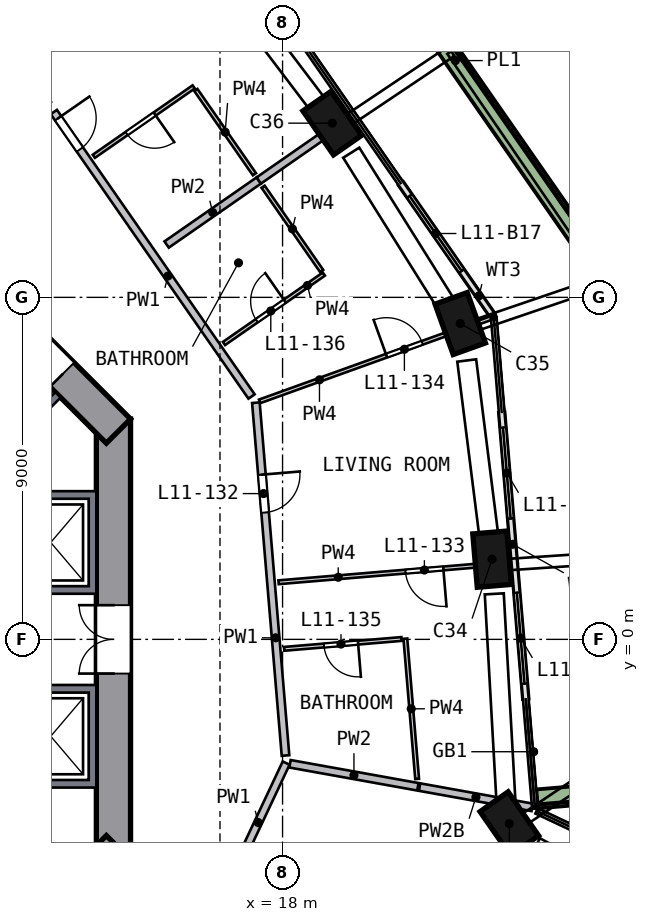
"""IFC4 building model, lengths in metres.
Left out: names, types, materials, properties, quantities, classifications, styles, units other than length and angle.
Written with IfcOpenShell. Run it as: python <this file> out.ifc"""

import sys

from ifc_helpers import new_model, si_unit, direction, frame, frame_2d, origin, origin_2d, place, context, subcontext, project, spatial, polyline, rectangle, outline, extrude, element, fill, save


model = new_model("IFC4")
c1 = context("Model", 3, precision=1e-05, world=origin(), true_north=direction((0.0, 1.0)))
c2 = subcontext(c1, "Body", "Model", "MODEL_VIEW")
j1 = project(units=[si_unit("LENGTHUNIT", "METRE"), si_unit("PLANEANGLEUNIT", "RADIAN")], contexts=[c1])
p1 = place(None, origin())
s1 = spatial("IfcSite", under=j1, at=p1, CompositionType="ELEMENT")
p2 = place(p1, origin())
s2 = spatial("IfcBuilding", under=s1, at=p2, CompositionType="ELEMENT")
p3 = place(p2, frame((0.0, 0.0, 53.0)))
s3 = spatial("IfcBuildingStorey", under=s2, at=p3, CompositionType="ELEMENT", Elevation=53.0)
p4 = place(p3, frame((23.94, -4.988, 0.0), z_axis=(0.022728624, 0.114023197, 0.993218063), x_axis=(0.574642782, -0.814450427, 0.080350333)))
e1 = element("IfcColumn", 1, at=p4, inside=s3, PredefinedType="COLUMN", context=c2, shape_type="SweptSolid", body=[
    extrude(rectangle(XDim=1.4, YDim=0.9, at=origin_2d()), origin(), (0.0, 0.0, 1.0), 3.212),
])
p5 = place(p3, frame((23.525, 1.976, 0.0), z_axis=(-0.010266843, 0.111794513, 0.993678307), x_axis=(-0.082474278, 0.990250205, -0.11226097)))
e2 = element("IfcColumn", 2, at=p5, inside=s3, PredefinedType="COLUMN", context=c2, shape_type="SweptSolid", body=[
    extrude(rectangle(XDim=1.4, YDim=0.9, at=origin_2d()), origin(), (0.0, 0.0, 1.0), 3.21),
])
p6 = place(p3, frame((22.723, 8.181, 0.0), z_axis=(-0.03976275, 0.107731963, 0.993384491), x_axis=(0.336043012, -0.934820186, 0.114831678)))
e3 = element("IfcColumn", 3, at=p6, inside=s3, PredefinedType="COLUMN", context=c2, shape_type="SweptSolid", body=[
    extrude(rectangle(XDim=1.4, YDim=0.9, at=origin_2d()), origin(), (0.0, 0.0, 1.0), 3.211),
])
p7 = place(p3, frame((19.386, 13.474, 0.0), z_axis=(-0.064871143, 0.091640946, 0.993676845), x_axis=(-0.567217406, 0.815879269, -0.112273915)))
e4 = element("IfcColumn", 4, at=p7, inside=s3, PredefinedType="COLUMN", context=c2, shape_type="SweptSolid", body=[
    extrude(rectangle(XDim=1.4, YDim=0.9, at=origin_2d()), origin(), (0.0, 0.0, 1.0), 3.21),
])
p8 = place(p3, frame((13.55, -5.799, 0.0), z_axis=(0.0, 0.0, 1.0), x_axis=(0.0, 1.0, 0.0)))
e5 = element("IfcWall", 5, at=p8, inside=s3, PredefinedType="SHEAR", context=c2, shape_type="SweptSolid", body=[
    extrude(rectangle(XDim=11.598, YDim=0.9, at=frame_2d((5.799, 0.0))), origin(), (0.0, 0.0, 1.0), 3.5),
])
p9 = place(p8, frame((4.899, 0.0, 0.0)))
e6 = element("IfcOpeningElement", 6, at=p9, cuts=e5, PredefinedType="OPENING", context=c2, shape_type="SweptSolid", body=[
    extrude(rectangle(XDim=1.8, YDim=2.1, at=frame_2d((0.9, 1.05))), frame((0.0, 0.46, 0.0), z_axis=(0.0, -1.0, 0.0), x_axis=(1.0, 0.0, 0.0)), (0.0, 0.0, 1.0), 0.92),
])
p10 = place(p3, frame((13.682, 5.481, 0.0), z_axis=(0.0, 0.0, 1.0), x_axis=(-0.707106781, 0.707106781, 0.0)))
e7 = element("IfcWall", 7, at=p10, inside=s3, PredefinedType="SHEAR", context=c2, shape_type="SweptSolid", body=[
    extrude(rectangle(XDim=11.598, YDim=0.9, at=frame_2d((5.799, 0.0))), origin(), (0.0, 0.0, 1.0), 3.5),
])
p11 = place(p10, frame((2.099, 0.0, 0.0)))
e8 = element("IfcOpeningElement", 8, at=p11, cuts=e7, PredefinedType="OPENING", context=c2, shape_type="SweptSolid", body=[
    extrude(rectangle(XDim=1.2, YDim=2.1, at=frame_2d((0.6, 1.05))), frame((0.0, 0.46, 0.0), z_axis=(0.0, -1.0, 0.0), x_axis=(1.0, 0.0, 0.0)), (0.0, 0.0, 1.0), 0.92),
])
p12 = place(p3, frame((5.481, -13.682, 0.0), z_axis=(0.0, 0.0, 1.0), x_axis=(0.707106781, 0.707106781, 0.0)))
e9 = element("IfcWall", 9, at=p12, inside=s3, PredefinedType="SHEAR", context=c2, shape_type="SweptSolid", body=[
    extrude(rectangle(XDim=11.598, YDim=0.9, at=frame_2d((5.799, 0.0))), origin(), (0.0, 0.0, 1.0), 3.5),
])
p13 = place(p12, frame((2.099, 0.0, 0.0)))
e10 = element("IfcOpeningElement", 10, at=p13, cuts=e9, PredefinedType="OPENING", context=c2, shape_type="SweptSolid", body=[
    extrude(rectangle(XDim=1.2, YDim=2.1, at=frame_2d((0.6, 1.05))), frame((0.0, 0.46, 0.0), z_axis=(0.0, -1.0, 0.0), x_axis=(1.0, 0.0, 0.0)), (0.0, 0.0, 1.0), 0.92),
])
p14 = place(p3, frame((24.4, -1.564, 0.0), z_axis=(0.0, 0.0, 1.0), x_axis=(-0.083617932, 0.996497888, 0.0)))
e11 = element("IfcWall", 11, at=p14, inside=s3, PredefinedType="SOLIDWALL", context=c2, shape_type="SweptSolid", body=[
    extrude(rectangle(XDim=3.6, YDim=0.15, at=frame_2d((1.8, 0.0))), origin(), (0.0, 0.0, 1.0), 2.425),
])
p15 = place(p14, frame((0.4, 0.0, 0.0)))
e12 = element("IfcOpeningElement", 12, at=p15, cuts=e11, PredefinedType="OPENING", context=c2, shape_type="SweptSolid", body=[
    extrude(rectangle(XDim=2.4, YDim=2.4, at=frame_2d((1.2, 1.2))), frame((0.0, 0.085, 0.0), z_axis=(0.0, -1.0, 0.0), x_axis=(1.0, 0.0, 0.0)), (0.0, 0.0, 1.0), 0.17),
])
p16 = place(p3, frame((24.099, 2.024, 0.0), z_axis=(0.0, 0.0, 1.0), x_axis=(-0.083713777, 0.996489841, 0.0)))
e13 = element("IfcWall", 13, at=p16, inside=s3, PredefinedType="SOLIDWALL", context=c2, shape_type="SweptSolid", body=[
    extrude(rectangle(XDim=3.96, YDim=0.15, at=frame_2d((1.98, 0.0))), origin(), (0.0, 0.0, 1.0), 2.425),
])
p17 = place(p16, frame((1.16, 0.0, 0.0)))
e14 = element("IfcOpeningElement", 14, at=p17, cuts=e13, PredefinedType="OPENING", context=c2, shape_type="SweptSolid", body=[
    extrude(rectangle(XDim=2.4, YDim=2.4, at=frame_2d((1.2, 1.2))), frame((0.0, 0.085, 0.0), z_axis=(0.0, -1.0, 0.0), x_axis=(1.0, 0.0, 0.0)), (0.0, 0.0, 1.0), 0.17),
])
p18 = place(p3, frame((23.51, 8.547, 0.0), z_axis=(0.0, 0.0, 1.0), x_axis=(-0.570711776, 0.821150454, 0.0)))
e15 = element("IfcWall", 15, at=p18, inside=s3, PredefinedType="SOLIDWALL", context=c2, shape_type="SweptSolid", body=[
    extrude(rectangle(XDim=4.199, YDim=0.15, at=frame_2d((2.099, 0.0))), origin(), (0.0, 0.0, 1.0), 2.425),
])
p19 = place(p18, frame((1.399, 0.0, 0.0)))
e16 = element("IfcOpeningElement", 16, at=p19, cuts=e15, PredefinedType="OPENING", context=c2, shape_type="SweptSolid", body=[
    extrude(rectangle(XDim=2.4, YDim=2.4, at=frame_2d((1.2, 1.2))), frame((0.0, 0.085, 0.0), z_axis=(0.0, -1.0, 0.0), x_axis=(1.0, 0.0, 0.0)), (0.0, 0.0, 1.0), 0.17),
])
p20 = place(p3, frame((24.697, -4.198, 0.0), z_axis=(0.0, 0.0, 1.0), x_axis=(0.996495576, 0.083645489, 0.0)))
e17 = element("IfcWall", 17, at=p20, inside=s3, PredefinedType="SOLIDWALL", context=c2, shape_type="SweptSolid", body=[
    extrude(rectangle(XDim=3.199, YDim=0.5, at=frame_2d((1.6, 0.0))), origin(), (0.0, 0.0, 1.0), 0.7),
])
p21 = place(p3, frame((26.465, 9.597, 0.0), z_axis=(0.0, 0.0, 1.0), x_axis=(-0.570705822, 0.821154593, 0.0)))
e18 = element("IfcWall", 18, at=p21, inside=s3, PredefinedType="SOLIDWALL", context=c2, shape_type="SweptSolid", body=[
    extrude(rectangle(XDim=13.723, YDim=0.5, at=frame_2d((6.862, 0.0))), origin(), (0.0, 0.0, 1.0), 0.7),
])
p22 = place(p3, origin())
e19 = element("IfcWall", 19, at=p22, inside=s3, PredefinedType="SOLIDWALL", context=c2, shape_type="SweptSolid", body=[
    extrude(outline(polyline([(13.1, -3.9), (10.9, -3.9), (10.9, -3.7), (12.9, -3.7), (12.9, -1.4), (10.9, -1.4), (10.9, -1.2), (13.1, -1.2), (13.1, -3.9)])), origin(), (0.0, 0.0, 1.0), 3.19),
])
p23 = place(p3, origin())
e20 = element("IfcWall", 20, at=p23, inside=s3, PredefinedType="SOLIDWALL", context=c2, shape_type="SweptSolid", body=[
    extrude(outline(polyline([(13.1, 3.9), (13.1, 1.2), (10.9, 1.2), (10.9, 1.4), (12.9, 1.4), (12.9, 3.7), (10.9, 3.7), (10.9, 3.9), (13.1, 3.9)])), origin(), (0.0, 0.0, 1.0), 3.19),
])
for number, where, z_axis, x_axis in (
    (21, (9.334, 3.677, 0.0), (0.0, 0.0, 1.0), (0.707, 0.707, 0.0)),
    (22, (9.334, -3.677, 0.0), (0.0, 0.0, 1.0), (0.707, -0.707, 0.0)),
):
    element("IfcWall", number, at=place(p3, frame(where, z_axis=z_axis, x_axis=x_axis)), inside=s3, PredefinedType="SOLIDWALL", context=c2, shape_type="SweptSolid", body=[
        extrude(rectangle(XDim=3.9, YDim=0.2, at=frame_2d((1.95, 0.0))), origin(), (0.0, 0.0, 1.0), 3.19),
    ])
p24 = place(p3, frame((11.981, 13.877, 0.0), z_axis=(0.0, 0.0, 1.0), x_axis=(0.570714468, -0.821148583, 0.0)))
e23 = element("IfcWall", 23, at=p24, inside=s3, PredefinedType="SOLIDWALL", context=c2, shape_type="SweptSolid", body=[
    extrude(rectangle(XDim=9.116, YDim=0.2, at=frame_2d((4.558, 0.0))), origin(), (0.0, 0.0, 1.0), 3.19),
])
p25 = place(p24, frame((0.2, 0.0, 0.0)))
e24 = element("IfcOpeningElement", 24, at=p25, cuts=e23, PredefinedType="OPENING", context=c2, shape_type="SweptSolid", body=[
    extrude(rectangle(XDim=1.0, YDim=2.1, at=frame_2d((0.5, 1.05))), frame((0.0, 0.11, 0.0), z_axis=(0.0, -1.0, 0.0), x_axis=(1.0, 0.0, 0.0)), (0.0, 0.0, 1.0), 0.22),
])
p26 = place(p3, frame((16.622, -6.385, 0.0), z_axis=(0.0, 0.0, 1.0), x_axis=(0.425797036, 0.904818702, 0.0)))
e25 = element("IfcWall", 25, at=p26, inside=s3, PredefinedType="SOLIDWALL", context=c2, shape_type="SweptSolid", body=[
    extrude(rectangle(XDim=3.458, YDim=0.2, at=frame_2d((1.729, 0.0))), origin(), (0.0, 0.0, 1.0), 3.19),
])
p27 = place(p3, frame((17.298, 6.228, 0.0), z_axis=(0.0, 0.0, 1.0), x_axis=(0.083672212, -0.996493332, 0.0)))
e26 = element("IfcWall", 26, at=p27, inside=s3, PredefinedType="SOLIDWALL", context=c2, shape_type="SweptSolid", body=[
    extrude(rectangle(XDim=9.317, YDim=0.2, at=frame_2d((4.658, 0.0))), origin(), (0.0, 0.0, 1.0), 3.19),
])
p28 = place(p27, frame((1.9, 0.0, 0.0)))
e27 = element("IfcOpeningElement", 27, at=p28, cuts=e26, PredefinedType="OPENING", context=c2, shape_type="SweptSolid", body=[
    extrude(rectangle(XDim=1.0, YDim=2.1, at=frame_2d((0.5, 1.05))), frame((0.0, 0.11, 0.0), z_axis=(0.0, -1.0, 0.0), x_axis=(1.0, 0.0, 0.0)), (0.0, 0.0, 1.0), 0.22),
])
p29 = place(p3, frame((14.949, 10.39, 0.0), z_axis=(0.0, 0.0, 1.0), x_axis=(0.82115792, 0.570701034, 0.0)))
e28 = element("IfcWall", 28, at=p29, inside=s3, PredefinedType="SOLIDWALL", context=c2, shape_type="SweptSolid", body=[
    extrude(rectangle(XDim=2.953, YDim=0.2, at=frame_2d((1.476, 0.0))), origin(), (0.0, 0.0, 1.0), 3.19),
])
p30 = place(p3, frame((17.374, 12.075, 0.0), z_axis=(0.0, 0.0, 1.0), x_axis=(0.821109247, 0.570771062, 0.0)))
e29 = element("IfcWall", 29, at=p30, inside=s3, PredefinedType="SOLIDWALL", context=c2, shape_type="SweptSolid", body=[
    extrude(rectangle(XDim=2.95, YDim=0.2, at=frame_2d((1.475, 0.0))), origin(), (0.0, 0.0, 1.0), 3.19),
])
p31 = place(p3, frame((18.196, -3.274, 0.0), z_axis=(0.0, 0.0, 1.0), x_axis=(0.984190545, -0.177112877, 0.0)))
e30 = element("IfcWall", 30, at=p31, inside=s3, PredefinedType="SOLIDWALL", context=c2, shape_type="SweptSolid", body=[
    extrude(rectangle(XDim=3.418, YDim=0.2, at=frame_2d((1.709, 0.0))), origin(), (0.0, 0.0, 1.0), 3.19),
])
p32 = place(p3, frame((21.606, -3.887, 0.0), z_axis=(0.0, 0.0, 1.0), x_axis=(0.984186151, -0.177137293, 0.0)))
e31 = element("IfcWall", 31, at=p32, inside=s3, PredefinedType="SOLIDWALL", context=c2, shape_type="SweptSolid", body=[
    extrude(rectangle(XDim=3.011, YDim=0.2, at=frame_2d((1.506, 0.0))), origin(), (0.0, 0.0, 1.0), 2.69),
])
p33 = place(p3, frame((15.662, 14.539, 0.0), z_axis=(0.0, 0.0, 1.0), x_axis=(-0.821155462, -0.570704572, 0.0)))
e32 = element("IfcWall", 32, at=p33, inside=s3, PredefinedType="PARTITIONING", context=c2, shape_type="SweptSolid", body=[
    extrude(rectangle(XDim=3.2, YDim=0.1, at=frame_2d((1.6, 0.0))), origin(), (0.0, 0.0, 1.0), 3.19),
])
p34 = place(p33, frame((1.25, 0.0, 0.0)))
e33 = element("IfcOpeningElement", 33, at=p34, cuts=e32, PredefinedType="OPENING", context=c2, shape_type="SweptSolid", body=[
    extrude(rectangle(XDim=0.9, YDim=2.1, at=frame_2d((0.45, 1.05))), frame((0.0, 0.06, 0.0), z_axis=(0.0, -1.0, 0.0), x_axis=(1.0, 0.0, 0.0)), (0.0, 0.0, 1.0), 0.12),
])
p35 = place(p3, frame((15.719, 14.457, 0.0), z_axis=(0.0, 0.0, 1.0), x_axis=(0.570704152, -0.821155753, 0.0)))
e34 = element("IfcWall", 34, at=p35, inside=s3, PredefinedType="PARTITIONING", context=c2, shape_type="SweptSolid", body=[
    extrude(rectangle(XDim=2.7, YDim=0.1, at=frame_2d((1.35, 0.0))), origin(), (0.0, 0.0, 1.0), 3.19),
])
p36 = place(p3, frame((16.458, 7.786, 0.0), z_axis=(0.0, 0.0, 1.0), x_axis=(0.821166367, 0.570688881, 0.0)))
e35 = element("IfcWall", 35, at=p36, inside=s3, PredefinedType="PARTITIONING", context=c2, shape_type="SweptSolid", body=[
    extrude(rectangle(XDim=3.2, YDim=0.1, at=frame_2d((1.6, 0.0))), origin(), (0.0, 0.0, 1.0), 3.19),
])
p37 = place(p36, frame((1.05, 0.0, 0.0)))
e36 = element("IfcOpeningElement", 36, at=p37, cuts=e35, PredefinedType="OPENING", context=c2, shape_type="SweptSolid", body=[
    extrude(rectangle(XDim=0.9, YDim=2.1, at=frame_2d((0.45, 1.05))), frame((0.0, 0.06, 0.0), z_axis=(0.0, -1.0, 0.0), x_axis=(1.0, 0.0, 0.0)), (0.0, 0.0, 1.0), 0.12),
])
p38 = place(p3, frame((19.029, 9.694, 0.0), z_axis=(0.0, 0.0, 1.0), x_axis=(-0.570746527, 0.821126301, 0.0)))
e37 = element("IfcWall", 37, at=p38, inside=s3, PredefinedType="PARTITIONING", context=c2, shape_type="SweptSolid", body=[
    extrude(rectangle(XDim=2.7, YDim=0.1, at=frame_2d((1.35, 0.0))), origin(), (0.0, 0.0, 1.0), 3.19),
])
p39 = place(p3, frame((21.132, 0.01, 0.0), z_axis=(0.0, 0.0, 1.0), x_axis=(-0.996489589, -0.083716781, 0.0)))
e38 = element("IfcWall", 38, at=p39, inside=s3, PredefinedType="PARTITIONING", context=c2, shape_type="SweptSolid", body=[
    extrude(rectangle(XDim=3.1, YDim=0.1, at=frame_2d((1.55, 0.0))), origin(), (0.0, 0.0, 1.0), 3.19),
])
p40 = place(p39, frame((1.15, 0.0, 0.0)))
e39 = element("IfcOpeningElement", 39, at=p40, cuts=e38, PredefinedType="OPENING", context=c2, shape_type="SweptSolid", body=[
    extrude(rectangle(XDim=0.9, YDim=2.1, at=frame_2d((0.45, 1.05))), frame((0.0, 0.06, 0.0), z_axis=(0.0, -1.0, 0.0), x_axis=(1.0, 0.0, 0.0)), (0.0, 0.0, 1.0), 0.12),
])
p41 = place(p3, frame((17.395, 6.263, 0.0), z_axis=(0.0, 0.0, 1.0), x_axis=(0.940881645, 0.338735488, 0.0)))
e40 = element("IfcWall", 40, at=p41, inside=s3, PredefinedType="PARTITIONING", context=c2, shape_type="SweptSolid", body=[
    extrude(rectangle(XDim=6.476, YDim=0.1, at=frame_2d((3.238, 0.0))), origin(), (0.0, 0.0, 1.0), 3.19),
])
p42 = place(p41, frame((3.55, 0.0, 0.0)))
e41 = element("IfcOpeningElement", 41, at=p42, cuts=e40, PredefinedType="OPENING", context=c2, shape_type="SweptSolid", body=[
    extrude(rectangle(XDim=1.0, YDim=2.1, at=frame_2d((0.5, 1.05))), frame((0.0, 0.06, 0.0), z_axis=(0.0, -1.0, 0.0), x_axis=(1.0, 0.0, 0.0)), (0.0, 0.0, 1.0), 0.12),
])
p43 = place(p3, frame((24.024, 2.017, 0.0), z_axis=(0.0, 0.0, 1.0), x_axis=(-0.996492442, -0.083682817, 0.0)))
e42 = element("IfcWall", 42, at=p43, inside=s3, PredefinedType="PARTITIONING", context=c2, shape_type="SweptSolid", body=[
    extrude(rectangle(XDim=6.15, YDim=0.1, at=frame_2d((3.075, 0.0))), origin(), (0.0, 0.0, 1.0), 3.19),
])
p44 = place(p43, frame((1.8, 0.0, 0.0)))
e43 = element("IfcOpeningElement", 43, at=p44, cuts=e42, PredefinedType="OPENING", context=c2, shape_type="SweptSolid", body=[
    extrude(rectangle(XDim=1.0, YDim=2.1, at=frame_2d((0.5, 1.05))), frame((0.0, 0.06, 0.0), z_axis=(0.0, -1.0, 0.0), x_axis=(1.0, 0.0, 0.0)), (0.0, 0.0, 1.0), 0.12),
])
p45 = place(p3, frame((21.541, -3.673, 0.0), z_axis=(0.0, 0.0, 1.0), x_axis=(-0.083710967, 0.996490077, 0.0)))
e44 = element("IfcWall", 44, at=p45, inside=s3, PredefinedType="PARTITIONING", context=c2, shape_type="SweptSolid", body=[
    extrude(rectangle(XDim=3.704, YDim=0.1, at=frame_2d((1.852, 0.0))), origin(), (0.0, 0.0, 1.0), 3.19),
])
p46 = place(p15, origin())
e45 = element("IfcDoor", 45, at=p46, inside=s3, OperationType="SLIDING_TO_RIGHT", PredefinedType="DOOR", context=c2, shape_type="SweptSolid", body=[
    extrude(rectangle(XDim=2.4, YDim=2.4, at=frame_2d((1.2, 1.2))), frame((0.0, 0.025, 0.0), z_axis=(0.0, -1.0, 0.0), x_axis=(1.0, 0.0, 0.0)), (0.0, 0.0, 1.0), 0.05),
])
fill(e12, e45)
p47 = place(p17, origin())
e46 = element("IfcDoor", 46, at=p47, inside=s3, OperationType="SLIDING_TO_LEFT", PredefinedType="DOOR", context=c2, shape_type="SweptSolid", body=[
    extrude(rectangle(XDim=2.4, YDim=2.4, at=frame_2d((1.2, 1.2))), frame((0.0, 0.025, 0.0), z_axis=(0.0, -1.0, 0.0), x_axis=(1.0, 0.0, 0.0)), (0.0, 0.0, 1.0), 0.05),
])
fill(e14, e46)
p48 = place(p19, origin())
e47 = element("IfcDoor", 47, at=p48, inside=s3, OperationType="SLIDING_TO_LEFT", PredefinedType="DOOR", context=c2, shape_type="SweptSolid", body=[
    extrude(rectangle(XDim=2.4, YDim=2.4, at=frame_2d((1.2, 1.2))), frame((0.0, 0.025, 0.0), z_axis=(0.0, -1.0, 0.0), x_axis=(1.0, 0.0, 0.0)), (0.0, 0.0, 1.0), 0.05),
])
fill(e16, e47)
p49 = place(p9, origin())
e48 = element("IfcDoor", 48, at=p49, inside=s3, OperationType="DOUBLE_DOOR_SINGLE_SWING", PredefinedType="DOOR", context=c2, shape_type="SweptSolid", body=[
    extrude(rectangle(XDim=1.8, YDim=2.1, at=frame_2d((0.9, 1.05))), frame((0.0, 0.025, 0.0), z_axis=(0.0, -1.0, 0.0), x_axis=(1.0, 0.0, 0.0)), (0.0, 0.0, 1.0), 0.05),
])
fill(e6, e48)
p50 = place(p11, origin())
e49 = element("IfcDoor", 49, at=p50, inside=s3, OperationType="SINGLE_SWING_LEFT", PredefinedType="DOOR", context=c2, shape_type="SweptSolid", body=[
    extrude(rectangle(XDim=1.2, YDim=2.1, at=frame_2d((0.6, 1.05))), frame((0.0, 0.025, 0.0), z_axis=(0.0, -1.0, 0.0), x_axis=(1.0, 0.0, 0.0)), (0.0, 0.0, 1.0), 0.05),
])
fill(e8, e49)
p51 = place(p28, origin())
e50 = element("IfcDoor", 50, at=p51, inside=s3, OperationType="SINGLE_SWING_LEFT", PredefinedType="DOOR", context=c2, shape_type="SweptSolid", body=[
    extrude(rectangle(XDim=1.0, YDim=2.1, at=frame_2d((0.5, 1.05))), frame((0.0, 0.025, 0.0), z_axis=(0.0, -1.0, 0.0), x_axis=(1.0, 0.0, 0.0)), (0.0, 0.0, 1.0), 0.05),
])
fill(e27, e50)
p52 = place(p44, origin())
e51 = element("IfcDoor", 51, at=p52, inside=s3, OperationType="SINGLE_SWING_LEFT", PredefinedType="DOOR", context=c2, shape_type="SweptSolid", body=[
    extrude(rectangle(XDim=1.0, YDim=2.1, at=frame_2d((0.5, 1.05))), frame((0.0, 0.025, 0.0), z_axis=(0.0, -1.0, 0.0), x_axis=(1.0, 0.0, 0.0)), (0.0, 0.0, 1.0), 0.05),
])
fill(e43, e51)
p53 = place(p42, origin())
e52 = element("IfcDoor", 52, at=p53, inside=s3, OperationType="SINGLE_SWING_LEFT", PredefinedType="DOOR", context=c2, shape_type="SweptSolid", body=[
    extrude(rectangle(XDim=1.0, YDim=2.1, at=frame_2d((0.5, 1.05))), frame((0.0, 0.025, 0.0), z_axis=(0.0, -1.0, 0.0), x_axis=(1.0, 0.0, 0.0)), (0.0, 0.0, 1.0), 0.05),
])
fill(e41, e52)
p54 = place(p40, origin())
e53 = element("IfcDoor", 53, at=p54, inside=s3, OperationType="SINGLE_SWING_LEFT", PredefinedType="DOOR", context=c2, shape_type="SweptSolid", body=[
    extrude(rectangle(XDim=0.9, YDim=2.1, at=frame_2d((0.45, 1.05))), frame((0.0, 0.025, 0.0), z_axis=(0.0, -1.0, 0.0), x_axis=(1.0, 0.0, 0.0)), (0.0, 0.0, 1.0), 0.05),
])
fill(e39, e53)
p55 = place(p37, origin())
e54 = element("IfcDoor", 54, at=p55, inside=s3, OperationType="SINGLE_SWING_RIGHT", PredefinedType="DOOR", context=c2, shape_type="SweptSolid", body=[
    extrude(rectangle(XDim=0.9, YDim=2.1, at=frame_2d((0.45, 1.05))), frame((0.0, 0.025, 0.0), z_axis=(0.0, -1.0, 0.0), x_axis=(1.0, 0.0, 0.0)), (0.0, 0.0, 1.0), 0.05),
])
fill(e36, e54)
p56 = place(p25, origin())
e55 = element("IfcDoor", 55, at=p56, inside=s3, OperationType="SINGLE_SWING_LEFT", PredefinedType="DOOR", context=c2, shape_type="SweptSolid", body=[
    extrude(rectangle(XDim=1.0, YDim=2.1, at=frame_2d((0.5, 1.05))), frame((0.0, 0.025, 0.0), z_axis=(0.0, -1.0, 0.0), x_axis=(1.0, 0.0, 0.0)), (0.0, 0.0, 1.0), 0.05),
])
fill(e24, e55)
p57 = place(p34, origin())
e56 = element("IfcDoor", 56, at=p57, inside=s3, OperationType="SINGLE_SWING_LEFT", PredefinedType="DOOR", context=c2, shape_type="SweptSolid", body=[
    extrude(rectangle(XDim=0.9, YDim=2.1, at=frame_2d((0.45, 1.05))), frame((0.0, 0.025, 0.0), z_axis=(0.0, -1.0, 0.0), x_axis=(1.0, 0.0, 0.0)), (0.0, 0.0, 1.0), 0.05),
])
fill(e33, e56)
save(model, sys.argv[1])
